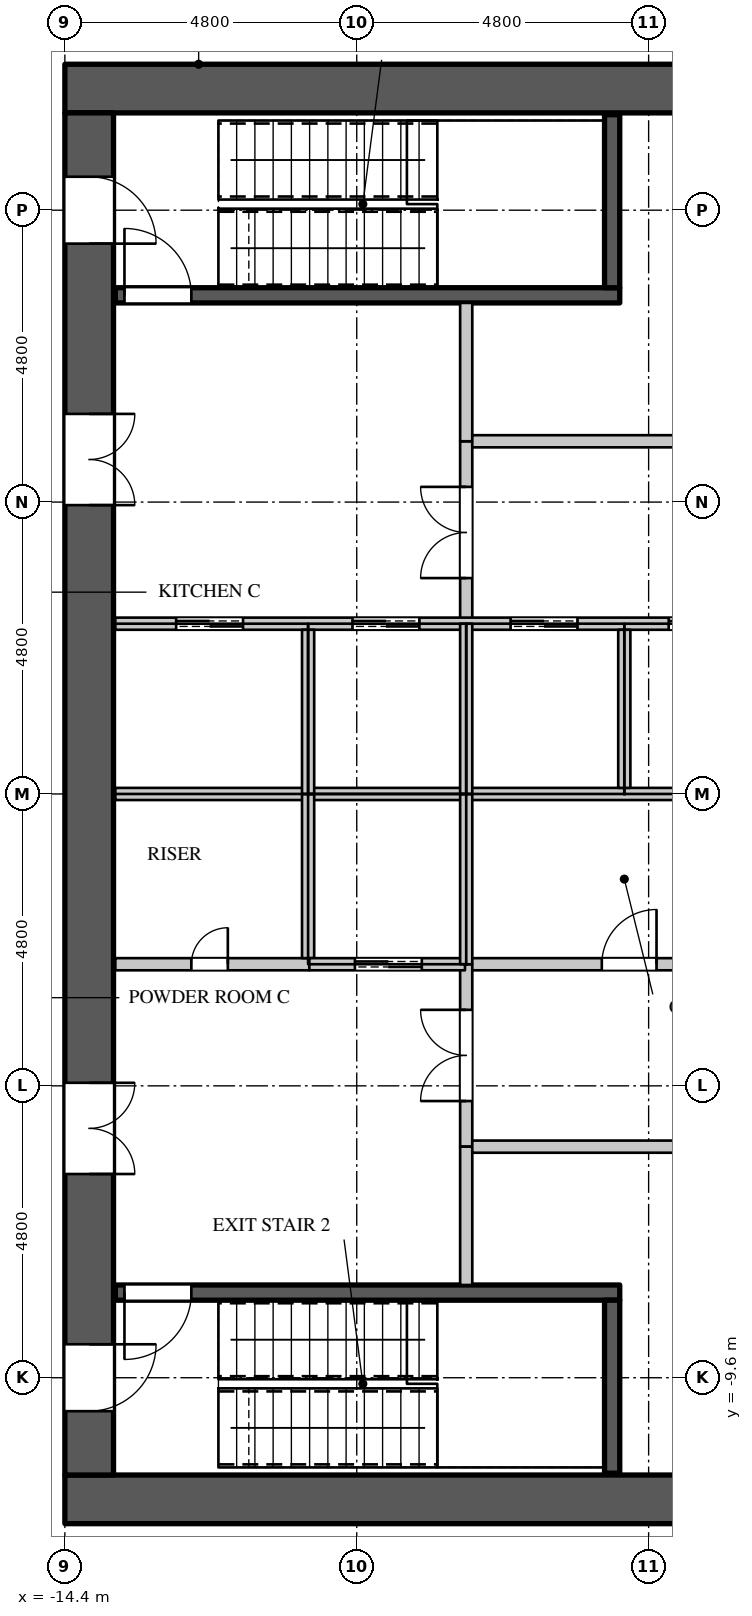
"""IFC4 building model, lengths in metres.
Left out: names, types, materials, properties, quantities, classifications, styles, units other than length and angle.
Written with IfcOpenShell. Run it as: python <this file> out.ifc"""

import sys

from ifc_helpers import new_model, si_unit, direction, frame, frame_2d, origin, place, context, subcontext, project, spatial, rectangle, extrude, element, fill, save


model = new_model("IFC4")
c1 = context("Model", 3, precision=1e-05, world=origin(), true_north=direction((0.0, 1.0)))
c2 = subcontext(c1, "Body", "Model", "MODEL_VIEW")
j1 = project(units=[si_unit("LENGTHUNIT", "METRE"), si_unit("PLANEANGLEUNIT", "RADIAN")], contexts=[c1])
p1 = place(None, origin())
s1 = spatial("IfcSite", under=j1, at=p1, CompositionType="ELEMENT")
p2 = place(p1, origin())
s2 = spatial("IfcBuilding", under=s1, at=p2, CompositionType="ELEMENT")
p3 = place(p2, frame((0.0, 0.0, 144.3)))
s3 = spatial("IfcBuildingStorey", under=s2, at=p3, CompositionType="ELEMENT", Elevation=144.3)
for number, where, z_axis, x_axis in (
    (1, (-14.4, 11.6, 0.0), (0.0, 0.0, 1.0), (1.0, 0.0, 0.0)),
    (2, (-14.4, -11.6, 0.0), (0.0, 0.0, 1.0), (1.0, 0.0, 0.0)),
):
    element("IfcWall", number, at=place(p3, frame(where, z_axis=z_axis, x_axis=x_axis)), inside=s3, PredefinedType="SHEAR", context=c2, shape_type="SweptSolid", body=[
        extrude(rectangle(XDim=28.8, YDim=0.8, at=frame_2d((14.4, 0.0))), origin(), (0.0, 0.0, 1.0), 4.2),
    ])
p4 = place(p3, frame((-14.0, -11.2, 0.0), z_axis=(0.0, 0.0, 1.0), x_axis=(0.0, 1.0, 0.0)))
e3 = element("IfcWall", 3, at=p4, inside=s3, PredefinedType="SHEAR", context=c2, shape_type="SweptSolid", body=[
    extrude(rectangle(XDim=22.4, YDim=0.8, at=frame_2d((11.2, 0.0))), origin(), (0.0, 0.0, 1.0), 4.2),
])
p5 = place(p4, frame((20.25, 0.0, 0.0)))
e4 = element("IfcOpeningElement", 4, at=p5, cuts=e3, PredefinedType="OPENING", context=c2, shape_type="SweptSolid", body=[
    extrude(rectangle(XDim=1.1, YDim=2.2, at=frame_2d((0.55, 1.1))), frame((0.0, 0.41, 0.0), z_axis=(0.0, -1.0, 0.0), x_axis=(1.0, 0.0, 0.0)), (0.0, 0.0, 1.0), 0.82),
])
p6 = place(p4, frame((1.05, 0.0, 0.0)))
e5 = element("IfcOpeningElement", 5, at=p6, cuts=e3, PredefinedType="OPENING", context=c2, shape_type="SweptSolid", body=[
    extrude(rectangle(XDim=1.1, YDim=2.2, at=frame_2d((0.55, 1.1))), frame((0.0, 0.41, 0.0), z_axis=(0.0, -1.0, 0.0), x_axis=(1.0, 0.0, 0.0)), (0.0, 0.0, 1.0), 0.82),
])
p7 = place(p4, frame((15.95, 0.0, 0.0)))
e6 = element("IfcOpeningElement", 6, at=p7, cuts=e3, PredefinedType="OPENING", context=c2, shape_type="SweptSolid", body=[
    extrude(rectangle(XDim=1.5, YDim=2.4, at=frame_2d((0.75, 1.2))), frame((0.0, 0.41, 0.0), z_axis=(0.0, -1.0, 0.0), x_axis=(1.0, 0.0, 0.0)), (0.0, 0.0, 1.0), 0.82),
])
p8 = place(p4, frame((4.95, 0.0, 0.0)))
e7 = element("IfcOpeningElement", 7, at=p8, cuts=e3, PredefinedType="OPENING", context=c2, shape_type="SweptSolid", body=[
    extrude(rectangle(XDim=1.5, YDim=2.4, at=frame_2d((0.75, 1.2))), frame((0.0, 0.41, 0.0), z_axis=(0.0, -1.0, 0.0), x_axis=(1.0, 0.0, 0.0)), (0.0, 0.0, 1.0), 0.82),
])
p9 = place(p3, frame((-7.82, -2.8, 0.0), z_axis=(0.0, 0.0, 1.0), x_axis=(1.0, 0.0, 0.0)))
e8 = element("IfcWall", 8, at=p9, inside=s3, PredefinedType="PARTITIONING", context=c2, shape_type="SweptSolid", body=[
    extrude(rectangle(XDim=9.64, YDim=0.2, at=frame_2d((4.82, 0.0))), origin(), (0.0, 0.0, 1.0), 3.798),
])
p10 = place(p9, frame((2.25, 0.0, 0.0)))
e9 = element("IfcOpeningElement", 9, at=p10, cuts=e8, PredefinedType="OPENING", context=c2, shape_type="SweptSolid", body=[
    extrude(rectangle(XDim=0.9, YDim=2.2, at=frame_2d((0.45, 1.1))), frame((0.0, 0.11, 0.0), z_axis=(0.0, -1.0, 0.0), x_axis=(1.0, 0.0, 0.0)), (0.0, 0.0, 1.0), 0.22),
])
p11 = place(p9, frame((6.9, 0.0, 0.0)))
e10 = element("IfcOpeningElement", 10, at=p11, cuts=e8, PredefinedType="OPENING", context=c2, shape_type="SweptSolid", body=[
    extrude(rectangle(XDim=0.9, YDim=2.2, at=frame_2d((0.45, 1.1))), frame((0.0, 0.11, 0.0), z_axis=(0.0, -1.0, 0.0), x_axis=(1.0, 0.0, 0.0)), (0.0, 0.0, 1.0), 0.22),
])
p12 = place(p3, frame((-7.8, -5.8, 0.0), z_axis=(0.0, 0.0, 1.0), x_axis=(0.0, 1.0, 0.0)))
e11 = element("IfcWall", 11, at=p12, inside=s3, PredefinedType="PARTITIONING", context=c2, shape_type="SweptSolid", body=[
    extrude(rectangle(XDim=3.0, YDim=0.2, at=frame_2d((1.5, 0.0))), origin(), (0.0, 0.0, 1.0), 3.798),
])
p13 = place(p12, frame((0.75, 0.0, 0.0)))
e12 = element("IfcOpeningElement", 12, at=p13, cuts=e11, PredefinedType="OPENING", context=c2, shape_type="SweptSolid", body=[
    extrude(rectangle(XDim=1.5, YDim=2.4, at=frame_2d((0.75, 1.2))), frame((0.0, 0.11, 0.0), z_axis=(0.0, -1.0, 0.0), x_axis=(1.0, 0.0, 0.0)), (0.0, 0.0, 1.0), 0.22),
])
p14 = place(p3, frame((-7.8, 2.8, 0.0), z_axis=(0.0, 0.0, 1.0), x_axis=(0.0, 1.0, 0.0)))
e13 = element("IfcWall", 13, at=p14, inside=s3, PredefinedType="PARTITIONING", context=c2, shape_type="SweptSolid", body=[
    extrude(rectangle(XDim=3.0, YDim=0.2, at=frame_2d((1.5, 0.0))), origin(), (0.0, 0.0, 1.0), 3.798),
])
p15 = place(p14, frame((0.75, 0.0, 0.0)))
e14 = element("IfcOpeningElement", 14, at=p15, cuts=e13, PredefinedType="OPENING", context=c2, shape_type="SweptSolid", body=[
    extrude(rectangle(XDim=1.5, YDim=2.4, at=frame_2d((0.75, 1.2))), frame((0.0, 0.11, 0.0), z_axis=(0.0, -1.0, 0.0), x_axis=(1.0, 0.0, 0.0)), (0.0, 0.0, 1.0), 0.22),
])
p16 = place(p3, frame((-13.57, -2.8, 0.0), z_axis=(0.0, 0.0, 1.0), x_axis=(1.0, 0.0, 0.0)))
e15 = element("IfcWall", 15, at=p16, inside=s3, PredefinedType="PARTITIONING", context=c2, shape_type="SweptSolid", body=[
    extrude(rectangle(XDim=3.19, YDim=0.2, at=frame_2d((1.595, 0.0))), origin(), (0.0, 0.0, 1.0), 3.798),
])
p17 = place(p16, frame((1.25, 0.0, 0.0)))
e16 = element("IfcOpeningElement", 16, at=p17, cuts=e15, PredefinedType="OPENING", context=c2, shape_type="SweptSolid", body=[
    extrude(rectangle(XDim=0.6, YDim=2.0, at=frame_2d((0.3, 1.0))), frame((0.0, 0.11, 0.0), z_axis=(0.0, -1.0, 0.0), x_axis=(1.0, 0.0, 0.0)), (0.0, 0.0, 1.0), 0.22),
])
p18 = place(p3, frame((-7.8, -8.075, 0.0), z_axis=(0.0, 0.0, 1.0), x_axis=(0.0, 1.0, 0.0)))
e17 = element("IfcWall", 17, at=p18, inside=s3, PredefinedType="PARTITIONING", context=c2, shape_type="SweptSolid", body=[
    extrude(rectangle(XDim=2.275, YDim=0.2, at=frame_2d((1.137, 0.0))), origin(), (0.0, 0.0, 1.0), 3.798),
])
p19 = place(p3, frame((-7.7, -5.8, 0.0), z_axis=(0.0, 0.0, 1.0), x_axis=(1.0, 0.0, 0.0)))
e18 = element("IfcWall", 18, at=p19, inside=s3, PredefinedType="PARTITIONING", context=c2, shape_type="SweptSolid", body=[
    extrude(rectangle(XDim=11.72, YDim=0.2, at=frame_2d((5.86, 0.0))), origin(), (0.0, 0.0, 1.0), 3.798),
])
p20 = place(p19, frame((5.4, 0.0, 0.0)))
e19 = element("IfcOpeningElement", 19, at=p20, cuts=e18, PredefinedType="OPENING", context=c2, shape_type="SweptSolid", body=[
    extrude(rectangle(XDim=0.9, YDim=2.2, at=frame_2d((0.45, 1.1))), frame((0.0, 0.11, 0.0), z_axis=(0.0, -1.0, 0.0), x_axis=(1.0, 0.0, 0.0)), (0.0, 0.0, 1.0), 0.22),
])
p21 = place(p3, frame((-7.8, 5.8, 0.0), z_axis=(0.0, 0.0, 1.0), x_axis=(0.0, 1.0, 0.0)))
e20 = element("IfcWall", 20, at=p21, inside=s3, PredefinedType="PARTITIONING", context=c2, shape_type="SweptSolid", body=[
    extrude(rectangle(XDim=2.275, YDim=0.2, at=frame_2d((1.137, 0.0))), origin(), (0.0, 0.0, 1.0), 3.798),
])
p22 = place(p3, frame((-7.7, 5.8, 0.0), z_axis=(0.0, 0.0, 1.0), x_axis=(1.0, 0.0, 0.0)))
e21 = element("IfcWall", 21, at=p22, inside=s3, PredefinedType="PARTITIONING", context=c2, shape_type="SweptSolid", body=[
    extrude(rectangle(XDim=8.48, YDim=0.2, at=frame_2d((4.24, 0.0))), origin(), (0.0, 0.0, 1.0), 3.798),
])
p23 = place(p22, frame((3.8, 0.0, 0.0)))
e22 = element("IfcOpeningElement", 22, at=p23, cuts=e21, PredefinedType="OPENING", context=c2, shape_type="SweptSolid", body=[
    extrude(rectangle(XDim=0.9, YDim=2.2, at=frame_2d((0.45, 1.1))), frame((0.0, 0.11, 0.0), z_axis=(0.0, -1.0, 0.0), x_axis=(1.0, 0.0, 0.0)), (0.0, 0.0, 1.0), 0.22),
])
p24 = place(p3, frame((-13.57, 0.0, 0.0), z_axis=(0.0, 0.0, 1.0), x_axis=(1.0, 0.0, 0.0)))
e23 = element("IfcWall", 23, at=p24, inside=s3, PredefinedType="PARTITIONING", context=c2, shape_type="SweptSolid", body=[
    extrude(rectangle(XDim=23.97, YDim=0.2, at=frame_2d((11.985, 0.0))), origin(), (0.0, 0.0, 1.0), 3.798),
])
p25 = place(p3, frame((-13.57, 2.8, 0.0), z_axis=(0.0, 0.0, 1.0), x_axis=(1.0, 0.0, 0.0)))
e24 = element("IfcWall", 24, at=p25, inside=s3, PredefinedType="PARTITIONING", context=c2, shape_type="SweptSolid", body=[
    extrude(rectangle(XDim=23.97, YDim=0.2, at=frame_2d((11.985, 0.0))), origin(), (0.0, 0.0, 1.0), 3.798),
])
p26 = place(p25, frame((1.0, 0.0, 0.0)))
e25 = element("IfcOpeningElement", 25, at=p26, cuts=e24, PredefinedType="OPENING", context=c2, shape_type="SweptSolid", body=[
    extrude(rectangle(XDim=1.1, YDim=2.2, at=frame_2d((0.55, 1.1))), frame((0.0, 0.11, 0.0), z_axis=(0.0, -1.0, 0.0), x_axis=(1.0, 0.0, 0.0)), (0.0, 0.0, 1.0), 0.22),
])
p27 = place(p25, frame((3.9, 0.0, 0.0)))
e26 = element("IfcOpeningElement", 26, at=p27, cuts=e24, PredefinedType="OPENING", context=c2, shape_type="SweptSolid", body=[
    extrude(rectangle(XDim=1.1, YDim=2.2, at=frame_2d((0.55, 1.1))), frame((0.0, 0.11, 0.0), z_axis=(0.0, -1.0, 0.0), x_axis=(1.0, 0.0, 0.0)), (0.0, 0.0, 1.0), 0.22),
])
p28 = place(p25, frame((6.5, 0.0, 0.0)))
e27 = element("IfcOpeningElement", 27, at=p28, cuts=e24, PredefinedType="OPENING", context=c2, shape_type="SweptSolid", body=[
    extrude(rectangle(XDim=1.1, YDim=2.2, at=frame_2d((0.55, 1.1))), frame((0.0, 0.11, 0.0), z_axis=(0.0, -1.0, 0.0), x_axis=(1.0, 0.0, 0.0)), (0.0, 0.0, 1.0), 0.22),
])
p29 = place(p25, frame((9.1, 0.0, 0.0)))
e28 = element("IfcOpeningElement", 28, at=p29, cuts=e24, PredefinedType="OPENING", context=c2, shape_type="SweptSolid", body=[
    extrude(rectangle(XDim=1.1, YDim=2.2, at=frame_2d((0.55, 1.1))), frame((0.0, 0.11, 0.0), z_axis=(0.0, -1.0, 0.0), x_axis=(1.0, 0.0, 0.0)), (0.0, 0.0, 1.0), 0.22),
])
p30 = place(p25, frame((11.7, 0.0, 0.0)))
e29 = element("IfcOpeningElement", 29, at=p30, cuts=e24, PredefinedType="OPENING", context=c2, shape_type="SweptSolid", body=[
    extrude(rectangle(XDim=1.1, YDim=2.2, at=frame_2d((0.55, 1.1))), frame((0.0, 0.11, 0.0), z_axis=(0.0, -1.0, 0.0), x_axis=(1.0, 0.0, 0.0)), (0.0, 0.0, 1.0), 0.22),
])
p31 = place(p25, frame((14.3, 0.0, 0.0)))
e30 = element("IfcOpeningElement", 30, at=p31, cuts=e24, PredefinedType="OPENING", context=c2, shape_type="SweptSolid", body=[
    extrude(rectangle(XDim=1.1, YDim=2.2, at=frame_2d((0.55, 1.1))), frame((0.0, 0.11, 0.0), z_axis=(0.0, -1.0, 0.0), x_axis=(1.0, 0.0, 0.0)), (0.0, 0.0, 1.0), 0.22),
])
p32 = place(p25, frame((16.9, 0.0, 0.0)))
e31 = element("IfcOpeningElement", 31, at=p32, cuts=e24, PredefinedType="OPENING", context=c2, shape_type="SweptSolid", body=[
    extrude(rectangle(XDim=1.1, YDim=2.2, at=frame_2d((0.55, 1.1))), frame((0.0, 0.11, 0.0), z_axis=(0.0, -1.0, 0.0), x_axis=(1.0, 0.0, 0.0)), (0.0, 0.0, 1.0), 0.22),
])
p33 = place(p25, frame((19.5, 0.0, 0.0)))
e32 = element("IfcOpeningElement", 32, at=p33, cuts=e24, PredefinedType="OPENING", context=c2, shape_type="SweptSolid", body=[
    extrude(rectangle(XDim=1.1, YDim=2.2, at=frame_2d((0.55, 1.1))), frame((0.0, 0.11, 0.0), z_axis=(0.0, -1.0, 0.0), x_axis=(1.0, 0.0, 0.0)), (0.0, 0.0, 1.0), 0.22),
])
p34 = place(p3, frame((-10.4, -2.7, 0.0), z_axis=(0.0, 0.0, 1.0), x_axis=(0.0, 1.0, 0.0)))
e33 = element("IfcWall", 33, at=p34, inside=s3, PredefinedType="PARTITIONING", context=c2, shape_type="SweptSolid", body=[
    extrude(rectangle(XDim=2.7, YDim=0.2, at=frame_2d((1.35, 0.0))), origin(), (0.0, 0.0, 1.0), 3.798),
])
p35 = place(p3, frame((-10.38, -2.8, 0.0), z_axis=(0.0, 0.0, 1.0), x_axis=(1.0, 0.0, 0.0)))
e34 = element("IfcWall", 34, at=p35, inside=s3, PredefinedType="PARTITIONING", context=c2, shape_type="SweptSolid", body=[
    extrude(rectangle(XDim=2.56, YDim=0.2, at=frame_2d((1.28, 0.0))), origin(), (0.0, 0.0, 1.0), 3.798),
])
p36 = place(p35, frame((0.75, 0.0, 0.0)))
e35 = element("IfcOpeningElement", 35, at=p36, cuts=e34, PredefinedType="OPENING", context=c2, shape_type="SweptSolid", body=[
    extrude(rectangle(XDim=1.1, YDim=2.2, at=frame_2d((0.55, 1.1))), frame((0.0, 0.11, 0.0), z_axis=(0.0, -1.0, 0.0), x_axis=(1.0, 0.0, 0.0)), (0.0, 0.0, 1.0), 0.22),
])
p37 = place(p3, frame((-10.4, 0.0, 0.0), z_axis=(0.0, 0.0, 1.0), x_axis=(0.0, 1.0, 0.0)))
e36 = element("IfcWall", 36, at=p37, inside=s3, PredefinedType="PARTITIONING", context=c2, shape_type="SweptSolid", body=[
    extrude(rectangle(XDim=2.7, YDim=0.2, at=frame_2d((1.35, 0.0))), origin(), (0.0, 0.0, 1.0), 3.798),
])
for number, where, z_axis, x_axis in (
    (37, (-7.8, -2.8, 0.0), (0.0, 0.0, 1.0), (0.0, 1.0, 0.0)),
    (38, (-7.8, 0.0, 0.0), (0.0, 0.0, 1.0), (0.0, 1.0, 0.0)),
):
    element("IfcWall", number, at=place(p3, frame(where, z_axis=z_axis, x_axis=x_axis)), inside=s3, PredefinedType="PARTITIONING", context=c2, shape_type="SweptSolid", body=[
        extrude(rectangle(XDim=2.8, YDim=0.2, at=frame_2d((1.4, 0.0))), origin(), (0.0, 0.0, 1.0), 3.798),
    ])
p38 = place(p3, frame((-5.2, 0.1, 0.0), z_axis=(0.0, 0.0, 1.0), x_axis=(0.0, 1.0, 0.0)))
e39 = element("IfcWall", 39, at=p38, inside=s3, PredefinedType="PARTITIONING", context=c2, shape_type="SweptSolid", body=[
    extrude(rectangle(XDim=2.6, YDim=0.2, at=frame_2d((1.3, 0.0))), origin(), (0.0, 0.0, 1.0), 3.798),
])
p39 = place(p3, frame((-13.57, -8.2, 0.0), z_axis=(0.0, 0.0, 1.0), x_axis=(1.0, 0.0, 0.0)))
e40 = element("IfcWall", 40, at=p39, inside=s3, PredefinedType="SHEAR", context=c2, shape_type="SweptSolid", body=[
    extrude(rectangle(XDim=8.295, YDim=0.25, at=frame_2d((4.147, 0.0))), origin(), (0.0, 0.0, 1.0), 3.798),
])
p40 = place(p39, frame((0.15, 0.0, 0.0)))
e41 = element("IfcOpeningElement", 41, at=p40, cuts=e40, PredefinedType="OPENING", context=c2, shape_type="SweptSolid", body=[
    extrude(rectangle(XDim=1.1, YDim=2.2, at=frame_2d((0.55, 1.1))), frame((0.0, 0.135, 0.0), z_axis=(0.0, -1.0, 0.0), x_axis=(1.0, 0.0, 0.0)), (0.0, 0.0, 1.0), 0.27),
])
p41 = place(p3, frame((-13.57, 8.2, 0.0), z_axis=(0.0, 0.0, 1.0), x_axis=(1.0, 0.0, 0.0)))
e42 = element("IfcWall", 42, at=p41, inside=s3, PredefinedType="SHEAR", context=c2, shape_type="SweptSolid", body=[
    extrude(rectangle(XDim=8.295, YDim=0.25, at=frame_2d((4.147, 0.0))), origin(), (0.0, 0.0, 1.0), 3.798),
])
p42 = place(p41, frame((0.15, 0.0, 0.0)))
e43 = element("IfcOpeningElement", 43, at=p42, cuts=e42, PredefinedType="OPENING", context=c2, shape_type="SweptSolid", body=[
    extrude(rectangle(XDim=1.1, YDim=2.2, at=frame_2d((0.55, 1.1))), frame((0.0, 0.135, 0.0), z_axis=(0.0, -1.0, 0.0), x_axis=(1.0, 0.0, 0.0)), (0.0, 0.0, 1.0), 0.27),
])
for number, where, z_axis, x_axis in (
    (44, (-5.4, -11.17, 0.0), (0.0, 0.0, 1.0), (0.0, 1.0, 0.0)),
    (45, (-5.4, 8.325, 0.0), (0.0, 0.0, 1.0), (0.0, 1.0, 0.0)),
):
    element("IfcWall", number, at=place(p3, frame(where, z_axis=z_axis, x_axis=x_axis)), inside=s3, PredefinedType="SHEAR", context=c2, shape_type="SweptSolid", body=[
        extrude(rectangle(XDim=2.845, YDim=0.25, at=frame_2d((1.422, 0.0))), origin(), (0.0, 0.0, 1.0), 3.798),
    ])
p43 = place(p17, origin())
e46 = element("IfcDoor", 46, at=p43, inside=s3, OperationType="SINGLE_SWING_RIGHT", PredefinedType="DOOR", context=c2, shape_type="SweptSolid", body=[
    extrude(rectangle(XDim=0.6, YDim=2.0, at=frame_2d((0.3, 1.0))), frame((0.0, 0.025, 0.0), z_axis=(0.0, -1.0, 0.0), x_axis=(1.0, 0.0, 0.0)), (0.0, 0.0, 1.0), 0.05),
])
fill(e16, e46)
p44 = place(p10, origin())
e47 = element("IfcDoor", 47, at=p44, inside=s3, OperationType="SINGLE_SWING_RIGHT", PredefinedType="DOOR", context=c2, shape_type="SweptSolid", body=[
    extrude(rectangle(XDim=0.9, YDim=2.2, at=frame_2d((0.45, 1.1))), frame((0.0, 0.025, 0.0), z_axis=(0.0, -1.0, 0.0), x_axis=(1.0, 0.0, 0.0)), (0.0, 0.0, 1.0), 0.05),
])
fill(e9, e47)
p45 = place(p26, origin())
e48 = element("IfcDoor", 48, at=p45, inside=s3, OperationType="DOUBLE_DOOR_SLIDING", PredefinedType="DOOR", context=c2, shape_type="SweptSolid", body=[
    extrude(rectangle(XDim=1.1, YDim=2.2, at=frame_2d((0.55, 1.1))), frame((0.0, 0.025, 0.0), z_axis=(0.0, -1.0, 0.0), x_axis=(1.0, 0.0, 0.0)), (0.0, 0.0, 1.0), 0.05),
])
fill(e25, e48)
p46 = place(p27, origin())
e49 = element("IfcDoor", 49, at=p46, inside=s3, OperationType="DOUBLE_DOOR_SLIDING", PredefinedType="DOOR", context=c2, shape_type="SweptSolid", body=[
    extrude(rectangle(XDim=1.1, YDim=2.2, at=frame_2d((0.55, 1.1))), frame((0.0, 0.025, 0.0), z_axis=(0.0, -1.0, 0.0), x_axis=(1.0, 0.0, 0.0)), (0.0, 0.0, 1.0), 0.05),
])
fill(e26, e49)
p47 = place(p36, origin())
e50 = element("IfcDoor", 50, at=p47, inside=s3, OperationType="DOUBLE_DOOR_SLIDING", PredefinedType="DOOR", context=c2, shape_type="SweptSolid", body=[
    extrude(rectangle(XDim=1.1, YDim=2.2, at=frame_2d((0.55, 1.1))), frame((0.0, 0.025, 0.0), z_axis=(0.0, -1.0, 0.0), x_axis=(1.0, 0.0, 0.0)), (0.0, 0.0, 1.0), 0.05),
])
fill(e35, e50)
p48 = place(p28, origin())
e51 = element("IfcDoor", 51, at=p48, inside=s3, OperationType="DOUBLE_DOOR_SLIDING", PredefinedType="DOOR", context=c2, shape_type="SweptSolid", body=[
    extrude(rectangle(XDim=1.1, YDim=2.2, at=frame_2d((0.55, 1.1))), frame((0.0, 0.025, 0.0), z_axis=(0.0, -1.0, 0.0), x_axis=(1.0, 0.0, 0.0)), (0.0, 0.0, 1.0), 0.05),
])
fill(e27, e51)
p49 = place(p29, origin())
e52 = element("IfcDoor", 52, at=p49, inside=s3, OperationType="DOUBLE_DOOR_SLIDING", PredefinedType="DOOR", context=c2, shape_type="SweptSolid", body=[
    extrude(rectangle(XDim=1.1, YDim=2.2, at=frame_2d((0.55, 1.1))), frame((0.0, 0.025, 0.0), z_axis=(0.0, -1.0, 0.0), x_axis=(1.0, 0.0, 0.0)), (0.0, 0.0, 1.0), 0.05),
])
fill(e28, e52)
p50 = place(p42, origin())
e53 = element("IfcDoor", 53, at=p50, inside=s3, OperationType="SINGLE_SWING_LEFT", PredefinedType="DOOR", context=c2, shape_type="SweptSolid", body=[
    extrude(rectangle(XDim=1.1, YDim=2.2, at=frame_2d((0.55, 1.1))), frame((0.0, 0.025, 0.0), z_axis=(0.0, -1.0, 0.0), x_axis=(1.0, 0.0, 0.0)), (0.0, 0.0, 1.0), 0.05),
])
fill(e43, e53)
p51 = place(p40, origin())
e54 = element("IfcDoor", 54, at=p51, inside=s3, OperationType="SINGLE_SWING_RIGHT", PredefinedType="DOOR", context=c2, shape_type="SweptSolid", body=[
    extrude(rectangle(XDim=1.1, YDim=2.2, at=frame_2d((0.55, 1.1))), frame((0.0, 0.025, 0.0), z_axis=(0.0, -1.0, 0.0), x_axis=(1.0, 0.0, 0.0)), (0.0, 0.0, 1.0), 0.05),
])
fill(e41, e54)
p52 = place(p15, origin())
e55 = element("IfcDoor", 55, at=p52, inside=s3, OperationType="DOUBLE_DOOR_SINGLE_SWING", PredefinedType="DOOR", context=c2, shape_type="SweptSolid", body=[
    extrude(rectangle(XDim=1.5, YDim=2.4, at=frame_2d((0.75, 1.2))), frame((0.0, 0.025, 0.0), z_axis=(0.0, -1.0, 0.0), x_axis=(1.0, 0.0, 0.0)), (0.0, 0.0, 1.0), 0.05),
])
fill(e14, e55)
p53 = place(p13, origin())
e56 = element("IfcDoor", 56, at=p53, inside=s3, OperationType="DOUBLE_DOOR_SINGLE_SWING", PredefinedType="DOOR", context=c2, shape_type="SweptSolid", body=[
    extrude(rectangle(XDim=1.5, YDim=2.4, at=frame_2d((0.75, 1.2))), frame((0.0, 0.025, 0.0), z_axis=(0.0, -1.0, 0.0), x_axis=(1.0, 0.0, 0.0)), (0.0, 0.0, 1.0), 0.05),
])
fill(e12, e56)
p54 = place(p5, origin())
e57 = element("IfcDoor", 57, at=p54, inside=s3, OperationType="SINGLE_SWING_RIGHT", PredefinedType="DOOR", context=c2, shape_type="SweptSolid", body=[
    extrude(rectangle(XDim=1.1, YDim=2.2, at=frame_2d((0.55, 1.1))), frame((0.0, -0.345, 0.0), z_axis=(0.0, -1.0, 0.0), x_axis=(1.0, 0.0, 0.0)), (0.0, 0.0, 1.0), 0.05),
])
fill(e4, e57)
p55 = place(p6, origin())
e58 = element("IfcDoor", 58, at=p55, inside=s3, OperationType="SINGLE_SWING_LEFT", PredefinedType="DOOR", context=c2, shape_type="SweptSolid", body=[
    extrude(rectangle(XDim=1.1, YDim=2.2, at=frame_2d((0.55, 1.1))), frame((0.0, -0.345, 0.0), z_axis=(0.0, -1.0, 0.0), x_axis=(1.0, 0.0, 0.0)), (0.0, 0.0, 1.0), 0.05),
])
fill(e5, e58)
p56 = place(p7, origin())
e59 = element("IfcDoor", 59, at=p56, inside=s3, OperationType="DOUBLE_DOOR_SINGLE_SWING", PredefinedType="DOOR", context=c2, shape_type="SweptSolid", body=[
    extrude(rectangle(XDim=1.5, YDim=2.4, at=frame_2d((0.75, 1.2))), frame((0.0, -0.345, 0.0), z_axis=(0.0, -1.0, 0.0), x_axis=(1.0, 0.0, 0.0)), (0.0, 0.0, 1.0), 0.05),
])
fill(e6, e59)
p57 = place(p8, origin())
e60 = element("IfcDoor", 60, at=p57, inside=s3, OperationType="DOUBLE_DOOR_SINGLE_SWING", PredefinedType="DOOR", context=c2, shape_type="SweptSolid", body=[
    extrude(rectangle(XDim=1.5, YDim=2.4, at=frame_2d((0.75, 1.2))), frame((0.0, -0.345, 0.0), z_axis=(0.0, -1.0, 0.0), x_axis=(1.0, 0.0, 0.0)), (0.0, 0.0, 1.0), 0.05),
])
fill(e7, e60)
save(model, sys.argv[1])
